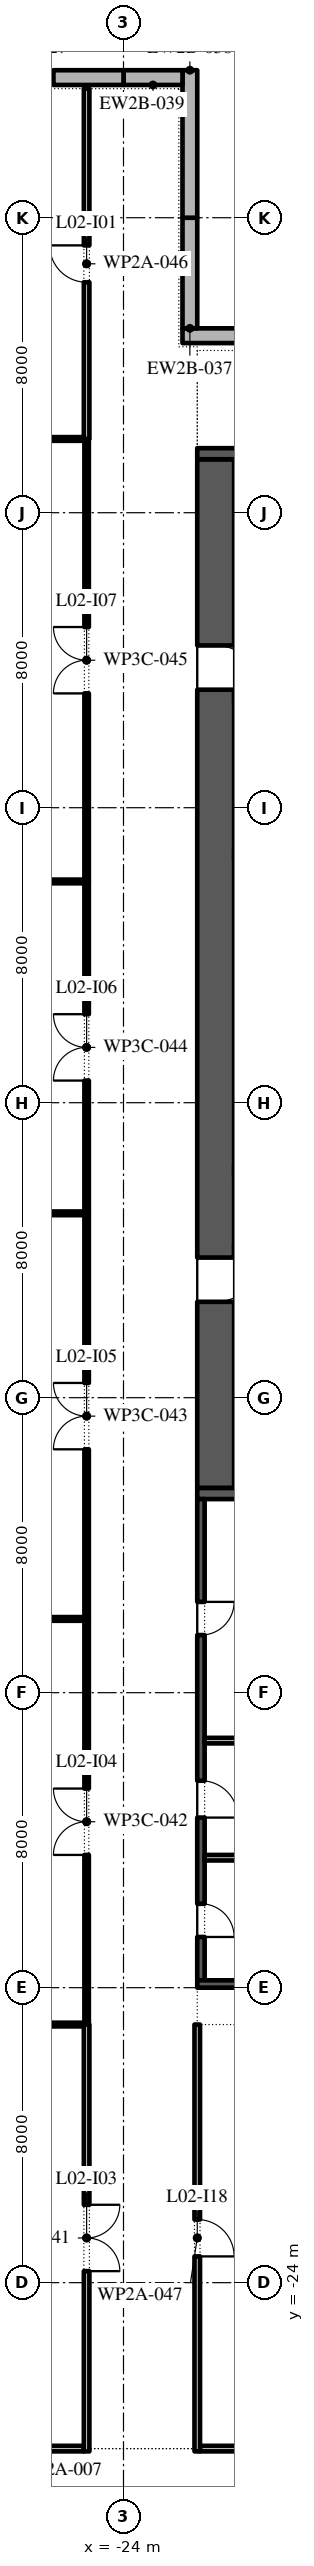
"""IFC4 building model, lengths in metres.
Left out: names, types, materials, properties, quantities, classifications, styles, units other than length and angle.
Written with IfcOpenShell. Run it as: python <this file> out.ifc"""

import sys

from ifc_helpers import new_model, si_unit, direction, frame, frame_2d, origin, place, context, subcontext, project, spatial, polyline, rectangle, outline, extrude, element, fill, save


model = new_model("IFC4")
c1 = context("Model", 3, precision=1e-05, world=origin(), true_north=direction((0.0, 1.0)))
c2 = subcontext(c1, "Body", "Model", "MODEL_VIEW")
j1 = project(units=[si_unit("LENGTHUNIT", "METRE"), si_unit("PLANEANGLEUNIT", "RADIAN")], contexts=[c1])
p1 = place(None, origin())
s1 = spatial("IfcSite", under=j1, at=p1, CompositionType="ELEMENT")
p2 = place(p1, origin())
s2 = spatial("IfcBuilding", under=s1, at=p2, CompositionType="ELEMENT")
p3 = place(p2, frame((0.0, 0.0, 14.0)))
s3 = spatial("IfcBuildingStorey", under=s2, at=p3, CompositionType="ELEMENT", Elevation=14.0)
p4 = place(p3, frame((-16.0, 28.8, 0.0), z_axis=(0.0, 0.0, 1.0), x_axis=(-1.0, 0.0, 0.0)))
e1 = element("IfcWall", 1, at=p4, inside=s3, PredefinedType="STANDARD", context=c2, shape_type="SweptSolid", body=[
    extrude(rectangle(XDim=6.4, YDim=0.4, at=frame_2d((3.2, 0.0))), origin(), (0.0, 0.0, 1.0), 4.9),
])
p5 = place(p3, frame((-22.2, 29.0, 0.0), z_axis=(0.0, 0.0, 1.0), x_axis=(0.0, 1.0, 0.0)))
e2 = element("IfcWall", 2, at=p5, inside=s3, PredefinedType="STANDARD", context=c2, shape_type="SweptSolid", body=[
    extrude(rectangle(XDim=3.0, YDim=0.4, at=frame_2d((1.5, 0.0))), origin(), (0.0, 0.0, 1.0), 4.9),
])
p6 = place(p3, frame((-22.2, 32.0, 0.0), z_axis=(0.0, 0.0, 1.0), x_axis=(0.0, 1.0, 0.0)))
e3 = element("IfcWall", 3, at=p6, inside=s3, PredefinedType="STANDARD", context=c2, shape_type="SweptSolid", body=[
    extrude(rectangle(XDim=4.0, YDim=0.4, at=frame_2d((2.0, 0.0))), origin(), (0.0, 0.0, 1.0), 4.9),
])
p7 = place(p3, frame((-22.4, 35.8, 0.0), z_axis=(0.0, 0.0, 1.0), x_axis=(-1.0, 0.0, 0.0)))
e4 = element("IfcWall", 4, at=p7, inside=s3, PredefinedType="STANDARD", context=c2, shape_type="SweptSolid", body=[
    extrude(rectangle(XDim=1.6, YDim=0.4, at=frame_2d((0.8, 0.0))), origin(), (0.0, 0.0, 1.0), 4.9),
])
p8 = place(p3, frame((-24.0, 35.8, 0.0), z_axis=(0.0, 0.0, 1.0), x_axis=(-1.0, 0.0, 0.0)))
e5 = element("IfcWall", 5, at=p8, inside=s3, PredefinedType="STANDARD", context=c2, shape_type="SweptSolid", body=[
    extrude(rectangle(XDim=8.0, YDim=0.4, at=frame_2d((4.0, 0.0))), origin(), (0.0, 0.0, 1.0), 4.9),
])
p9 = place(p8, frame((1.9, 0.0, 0.9)))
e6 = element("IfcOpeningElement", 6, at=p9, cuts=e5, PredefinedType="OPENING", context=c2, shape_type="SweptSolid", body=[
    extrude(outline(polyline([(0.0, 0.0), (1.8, 0.0), (1.8, 1.841), (1.785, 2.076), (1.739, 2.307), (1.663, 2.53), (1.559, 2.741), (1.428, 2.937), (1.273, 3.114), (1.096, 3.269), (0.9, 3.4), (0.704, 3.269), (0.527, 3.114), (0.372, 2.937), (0.241, 2.741), (0.137, 2.53), (0.061, 2.307), (0.015, 2.076), (0.0, 1.841), (0.0, 0.0)])), frame((0.0, 0.21, 0.0), z_axis=(0.0, -1.0, 0.0), x_axis=(1.0, 0.0, 0.0)), (0.0, 0.0, 1.0), 0.42),
])
p10 = place(p8, frame((4.3, 0.0, 0.9)))
e7 = element("IfcOpeningElement", 7, at=p10, cuts=e5, PredefinedType="OPENING", context=c2, shape_type="SweptSolid", body=[
    extrude(outline(polyline([(0.0, 0.0), (1.8, 0.0), (1.8, 1.841), (1.785, 2.076), (1.739, 2.307), (1.663, 2.53), (1.559, 2.741), (1.428, 2.937), (1.273, 3.114), (1.096, 3.269), (0.9, 3.4), (0.704, 3.269), (0.527, 3.114), (0.372, 2.937), (0.241, 2.741), (0.137, 2.53), (0.061, 2.307), (0.015, 2.076), (0.0, 1.841), (0.0, 0.0)])), frame((0.0, 0.21, 0.0), z_axis=(0.0, -1.0, 0.0), x_axis=(1.0, 0.0, 0.0)), (0.0, 0.0, 1.0), 0.42),
])
p11 = place(p3, frame((-21.5, -2.45, 0.0), z_axis=(0.0, 0.0, 1.0), x_axis=(0.0, 1.0, 0.0)))
e8 = element("IfcWall", 8, at=p11, inside=s3, PredefinedType="SHEAR", context=c2, shape_type="SweptSolid", body=[
    extrude(rectangle(XDim=27.9, YDim=1.0, at=frame_2d((13.95, 0.0))), origin(), (0.0, 0.0, 1.0), 4.9),
])
p12 = place(p11, frame((5.05, 0.0, 0.0)))
e9 = element("IfcOpeningElement", 9, at=p12, cuts=e8, PredefinedType="OPENING", context=c2, shape_type="SweptSolid", body=[
    extrude(rectangle(XDim=1.2, YDim=2.1, at=frame_2d((0.6, 1.05))), frame((0.0, 0.51, 0.0), z_axis=(0.0, -1.0, 0.0), x_axis=(1.0, 0.0, 0.0)), (0.0, 0.0, 1.0), 1.02),
])
p13 = place(p11, frame((21.65, 0.0, 0.0)))
e10 = element("IfcOpeningElement", 10, at=p13, cuts=e8, PredefinedType="OPENING", context=c2, shape_type="SweptSolid", body=[
    extrude(rectangle(XDim=1.2, YDim=2.1, at=frame_2d((0.6, 1.05))), frame((0.0, 0.51, 0.0), z_axis=(0.0, -1.0, 0.0), x_axis=(1.0, 0.0, 0.0)), (0.0, 0.0, 1.0), 1.02),
])
for number, where, z_axis, x_axis in (
    (11, (-22.0, -2.6, 0.0), (0.0, 0.0, 1.0), (1.0, 0.0, 0.0)),
    (12, (-22.0, 25.6, 0.0), (0.0, 0.0, 1.0), (1.0, 0.0, 0.0)),
):
    element("IfcWall", number, at=place(p3, frame(where, z_axis=z_axis, x_axis=x_axis)), inside=s3, PredefinedType="SHEAR", context=c2, shape_type="SweptSolid", body=[
        extrude(rectangle(XDim=12.0, YDim=0.3, at=frame_2d((6.0, 0.0))), origin(), (0.0, 0.0, 1.0), 4.9),
    ])
p14 = place(p3, frame((-21.9, -15.8, 0.0), z_axis=(0.0, 0.0, 1.0), x_axis=(0.0, 1.0, 0.0)))
e13 = element("IfcWall", 13, at=p14, inside=s3, PredefinedType="SHEAR", context=c2, shape_type="SweptSolid", body=[
    extrude(rectangle(XDim=13.05, YDim=0.2, at=frame_2d((6.525, 0.0))), origin(), (0.0, 0.0, 1.0), 4.9),
])
p15 = place(p14, frame((1.175, 0.0, 0.0)))
e14 = element("IfcOpeningElement", 14, at=p15, cuts=e13, PredefinedType="OPENING", context=c2, shape_type="SweptSolid", body=[
    extrude(rectangle(XDim=0.9, YDim=2.1, at=frame_2d((0.45, 1.05))), frame((0.0, 0.11, 0.0), z_axis=(0.0, -1.0, 0.0), x_axis=(1.0, 0.0, 0.0)), (0.0, 0.0, 1.0), 0.22),
])
p16 = place(p14, frame((4.413, 0.0, 0.0)))
e15 = element("IfcOpeningElement", 15, at=p16, cuts=e13, PredefinedType="OPENING", context=c2, shape_type="SweptSolid", body=[
    extrude(rectangle(XDim=1.0, YDim=2.1, at=frame_2d((0.5, 1.05))), frame((0.0, 0.11, 0.0), z_axis=(0.0, -1.0, 0.0), x_axis=(1.0, 0.0, 0.0)), (0.0, 0.0, 1.0), 0.22),
])
p17 = place(p14, frame((9.363, 0.0, 0.0)))
e16 = element("IfcOpeningElement", 16, at=p17, cuts=e13, PredefinedType="OPENING", context=c2, shape_type="SweptSolid", body=[
    extrude(rectangle(XDim=0.9, YDim=2.1, at=frame_2d((0.45, 1.05))), frame((0.0, 0.11, 0.0), z_axis=(0.0, -1.0, 0.0), x_axis=(1.0, 0.0, 0.0)), (0.0, 0.0, 1.0), 0.22),
])
p18 = place(p3, frame((-22.0, -15.9, 0.0), z_axis=(0.0, 0.0, 1.0), x_axis=(1.0, 0.0, 0.0)))
e17 = element("IfcWall", 17, at=p18, inside=s3, PredefinedType="SHEAR", context=c2, shape_type="SweptSolid", body=[
    extrude(rectangle(XDim=12.0, YDim=0.2, at=frame_2d((6.0, 0.0))), origin(), (0.0, 0.0, 1.0), 4.9),
])
for number, where, z_axis, x_axis in (
    (18, (-21.8, -9.3, 0.0), (0.0, 0.0, 1.0), (1.0, 0.0, 0.0)),
    (19, (-21.8, -12.475, 0.0), (0.0, 0.0, 1.0), (1.0, 0.0, 0.0)),
):
    element("IfcWall", number, at=place(p3, frame(where, z_axis=z_axis, x_axis=x_axis)), inside=s3, PredefinedType="PARTITIONING", context=c2, shape_type="SweptSolid", body=[
        extrude(rectangle(XDim=11.6, YDim=0.15, at=frame_2d((5.8, 0.0))), origin(), (0.0, 0.0, 1.0), 4.9),
    ])
p19 = place(p3, frame((-27.0, -28.5, 0.0), z_axis=(0.0, 0.0, 1.0), x_axis=(1.0, 0.0, 0.0)))
e20 = element("IfcWall", 20, at=p19, inside=s3, PredefinedType="PARTITIONING", context=c2, shape_type="SweptSolid", body=[
    extrude(rectangle(XDim=1.925, YDim=0.15, at=frame_2d((0.962, 0.0))), origin(), (0.0, 0.0, 1.0), 4.9),
])
p20 = place(p3, frame((-21.925, -28.5, 0.0), z_axis=(0.0, 0.0, 1.0), x_axis=(1.0, 0.0, 0.0)))
e21 = element("IfcWall", 21, at=p20, inside=s3, PredefinedType="PARTITIONING", context=c2, shape_type="SweptSolid", body=[
    extrude(rectangle(XDim=11.525, YDim=0.15, at=frame_2d((5.763, 0.0))), origin(), (0.0, 0.0, 1.0), 4.9),
])
p21 = place(p3, frame((-43.5, -17.0, 0.0), z_axis=(0.0, 0.0, 1.0), x_axis=(1.0, 0.0, 0.0)))
e22 = element("IfcWall", 22, at=p21, inside=s3, PredefinedType="PARTITIONING", context=c2, shape_type="SweptSolid", body=[
    extrude(rectangle(XDim=18.425, YDim=0.1, at=frame_2d((9.212, 0.0))), origin(), (0.0, 0.0, 1.0), 4.9),
])
p22 = place(p3, frame((-43.5, -6.0, 0.0), z_axis=(0.0, 0.0, 1.0), x_axis=(1.0, 0.0, 0.0)))
e23 = element("IfcWall", 23, at=p22, inside=s3, PredefinedType="PARTITIONING", context=c2, shape_type="SweptSolid", body=[
    extrude(rectangle(XDim=18.44, YDim=0.1, at=frame_2d((9.22, 0.0))), origin(), (0.0, 0.0, 1.0), 4.9),
])
p23 = place(p3, frame((-31.7, 5.0, 0.0), z_axis=(0.0, 0.0, 1.0), x_axis=(1.0, 0.0, 0.0)))
e24 = element("IfcWall", 24, at=p23, inside=s3, PredefinedType="PARTITIONING", context=c2, shape_type="SweptSolid", body=[
    extrude(rectangle(XDim=6.64, YDim=0.1, at=frame_2d((3.32, 0.0))), origin(), (0.0, 0.0, 1.0), 4.9),
])
p24 = place(p3, frame((-43.5, 14.0, 0.0), z_axis=(0.0, 0.0, 1.0), x_axis=(1.0, 0.0, 0.0)))
e25 = element("IfcWall", 25, at=p24, inside=s3, PredefinedType="PARTITIONING", context=c2, shape_type="SweptSolid", body=[
    extrude(rectangle(XDim=18.44, YDim=0.1, at=frame_2d((9.22, 0.0))), origin(), (0.0, 0.0, 1.0), 4.9),
])
p25 = place(p3, frame((-34.0, 26.0, 0.0), z_axis=(0.0, 0.0, 1.0), x_axis=(1.0, 0.0, 0.0)))
e26 = element("IfcWall", 26, at=p25, inside=s3, PredefinedType="PARTITIONING", context=c2, shape_type="SweptSolid", body=[
    extrude(rectangle(XDim=8.925, YDim=0.1, at=frame_2d((4.462, 0.0))), origin(), (0.0, 0.0, 1.0), 4.9),
])
p26 = place(p3, frame((-25.0, -28.575, 0.0), z_axis=(0.0, 0.0, 1.0), x_axis=(0.0, 1.0, 0.0)))
e27 = element("IfcWall", 27, at=p26, inside=s3, PredefinedType="PARTITIONING", context=c2, shape_type="SweptSolid", body=[
    extrude(rectangle(XDim=11.575, YDim=0.15, at=frame_2d((5.788, 0.0))), origin(), (0.0, 0.0, 1.0), 4.9),
])
p27 = place(p26, frame((4.887, 0.0, 0.0)))
e28 = element("IfcOpeningElement", 28, at=p27, cuts=e27, PredefinedType="OPENING", context=c2, shape_type="SweptSolid", body=[
    extrude(rectangle(XDim=1.8, YDim=2.1, at=frame_2d((0.9, 1.05))), frame((0.0, 0.085, 0.0), z_axis=(0.0, -1.0, 0.0), x_axis=(1.0, 0.0, 0.0)), (0.0, 0.0, 1.0), 0.17),
])
p28 = place(p3, frame((-25.0, -17.0, 0.0), z_axis=(0.0, 0.0, 1.0), x_axis=(0.0, 1.0, 0.0)))
e29 = element("IfcWall", 29, at=p28, inside=s3, PredefinedType="PARTITIONING", context=c2, shape_type="SweptSolid", body=[
    extrude(rectangle(XDim=11.0, YDim=0.12, at=frame_2d((5.5, 0.0))), origin(), (0.0, 0.0, 1.0), 4.9),
])
p29 = place(p28, frame((4.6, 0.0, 0.0)))
e30 = element("IfcOpeningElement", 30, at=p29, cuts=e29, PredefinedType="OPENING", context=c2, shape_type="SweptSolid", body=[
    extrude(rectangle(XDim=1.8, YDim=2.1, at=frame_2d((0.9, 1.05))), frame((0.0, 0.07, 0.0), z_axis=(0.0, -1.0, 0.0), x_axis=(1.0, 0.0, 0.0)), (0.0, 0.0, 1.0), 0.14),
])
p30 = place(p3, frame((-25.0, -6.0, 0.0), z_axis=(0.0, 0.0, 1.0), x_axis=(0.0, 1.0, 0.0)))
e31 = element("IfcWall", 31, at=p30, inside=s3, PredefinedType="PARTITIONING", context=c2, shape_type="SweptSolid", body=[
    extrude(rectangle(XDim=11.0, YDim=0.12, at=frame_2d((5.5, 0.0))), origin(), (0.0, 0.0, 1.0), 4.9),
])
p31 = place(p30, frame((4.6, 0.0, 0.0)))
e32 = element("IfcOpeningElement", 32, at=p31, cuts=e31, PredefinedType="OPENING", context=c2, shape_type="SweptSolid", body=[
    extrude(rectangle(XDim=1.8, YDim=2.1, at=frame_2d((0.9, 1.05))), frame((0.0, 0.07, 0.0), z_axis=(0.0, -1.0, 0.0), x_axis=(1.0, 0.0, 0.0)), (0.0, 0.0, 1.0), 0.14),
])
p32 = place(p3, frame((-25.0, 5.0, 0.0), z_axis=(0.0, 0.0, 1.0), x_axis=(0.0, 1.0, 0.0)))
e33 = element("IfcWall", 33, at=p32, inside=s3, PredefinedType="PARTITIONING", context=c2, shape_type="SweptSolid", body=[
    extrude(rectangle(XDim=9.0, YDim=0.12, at=frame_2d((4.5, 0.0))), origin(), (0.0, 0.0, 1.0), 4.9),
])
p33 = place(p32, frame((3.6, 0.0, 0.0)))
e34 = element("IfcOpeningElement", 34, at=p33, cuts=e33, PredefinedType="OPENING", context=c2, shape_type="SweptSolid", body=[
    extrude(rectangle(XDim=1.8, YDim=2.1, at=frame_2d((0.9, 1.05))), frame((0.0, 0.07, 0.0), z_axis=(0.0, -1.0, 0.0), x_axis=(1.0, 0.0, 0.0)), (0.0, 0.0, 1.0), 0.14),
])
p34 = place(p3, frame((-25.0, 14.0, 0.0), z_axis=(0.0, 0.0, 1.0), x_axis=(0.0, 1.0, 0.0)))
e35 = element("IfcWall", 35, at=p34, inside=s3, PredefinedType="PARTITIONING", context=c2, shape_type="SweptSolid", body=[
    extrude(rectangle(XDim=12.0, YDim=0.12, at=frame_2d((6.0, 0.0))), origin(), (0.0, 0.0, 1.0), 4.9),
])
p35 = place(p34, frame((5.1, 0.0, 0.0)))
e36 = element("IfcOpeningElement", 36, at=p35, cuts=e35, PredefinedType="OPENING", context=c2, shape_type="SweptSolid", body=[
    extrude(rectangle(XDim=1.8, YDim=2.1, at=frame_2d((0.9, 1.05))), frame((0.0, 0.07, 0.0), z_axis=(0.0, -1.0, 0.0), x_axis=(1.0, 0.0, 0.0)), (0.0, 0.0, 1.0), 0.14),
])
p36 = place(p3, frame((-25.0, 26.0, 0.0), z_axis=(0.0, 0.0, 1.0), x_axis=(0.0, 1.0, 0.0)))
e37 = element("IfcWall", 37, at=p36, inside=s3, PredefinedType="PARTITIONING", context=c2, shape_type="SweptSolid", body=[
    extrude(rectangle(XDim=9.5, YDim=0.15, at=frame_2d((4.75, 0.0))), origin(), (0.0, 0.0, 1.0), 4.9),
])
p37 = place(p36, frame((4.25, 0.0, 0.0)))
e38 = element("IfcOpeningElement", 38, at=p37, cuts=e37, PredefinedType="OPENING", context=c2, shape_type="SweptSolid", body=[
    extrude(rectangle(XDim=1.0, YDim=2.1, at=frame_2d((0.5, 1.05))), frame((0.0, 0.085, 0.0), z_axis=(0.0, -1.0, 0.0), x_axis=(1.0, 0.0, 0.0)), (0.0, 0.0, 1.0), 0.17),
])
p38 = place(p3, frame((-22.0, -28.575, 0.0), z_axis=(0.0, 0.0, 1.0), x_axis=(0.0, 1.0, 0.0)))
e39 = element("IfcWall", 39, at=p38, inside=s3, PredefinedType="PARTITIONING", context=c2, shape_type="SweptSolid", body=[
    extrude(rectangle(XDim=11.575, YDim=0.15, at=frame_2d((5.788, 0.0))), origin(), (0.0, 0.0, 1.0), 4.9),
])
p39 = place(p38, frame((5.288, 0.0, 0.0)))
e40 = element("IfcOpeningElement", 40, at=p39, cuts=e39, PredefinedType="OPENING", context=c2, shape_type="SweptSolid", body=[
    extrude(rectangle(XDim=1.0, YDim=2.1, at=frame_2d((0.5, 1.05))), frame((0.0, 0.085, 0.0), z_axis=(0.0, -1.0, 0.0), x_axis=(1.0, 0.0, 0.0)), (0.0, 0.0, 1.0), 0.17),
])
p40 = place(p9, origin())
e41 = element("IfcWindow", 41, at=p40, inside=s3, PartitioningType="DOUBLE_PANEL_VERTICAL", PredefinedType="WINDOW", context=c2, shape_type="SweptSolid", body=[
    extrude(outline(polyline([(0.0, 0.0), (1.8, 0.0), (1.8, 1.841), (1.785, 2.076), (1.739, 2.307), (1.663, 2.53), (1.559, 2.741), (1.428, 2.937), (1.273, 3.114), (1.096, 3.269), (0.9, 3.4), (0.704, 3.269), (0.527, 3.114), (0.372, 2.937), (0.241, 2.741), (0.137, 2.53), (0.061, 2.307), (0.015, 2.076), (0.0, 1.841), (0.0, 0.0)])), frame((0.0, 0.03, 0.0), z_axis=(0.0, -1.0, 0.0), x_axis=(1.0, 0.0, 0.0)), (0.0, 0.0, 1.0), 0.06),
])
fill(e6, e41)
p41 = place(p12, frame((1.2, 0.0, 0.0), z_axis=(0.0, 0.0, 1.0), x_axis=(-1.0, 0.0, 0.0)))
e42 = element("IfcDoor", 42, at=p41, inside=s3, OperationType="SINGLE_SWING_RIGHT", PredefinedType="DOOR", context=c2, shape_type="SweptSolid", body=[
    extrude(rectangle(XDim=1.2, YDim=2.1, at=frame_2d((0.6, 1.05))), frame((0.0, 0.025, 0.0), z_axis=(0.0, -1.0, 0.0), x_axis=(1.0, 0.0, 0.0)), (0.0, 0.0, 1.0), 0.05),
])
fill(e9, e42)
p42 = place(p13, frame((1.2, 0.0, 0.0), z_axis=(0.0, 0.0, 1.0), x_axis=(-1.0, 0.0, 0.0)))
e43 = element("IfcDoor", 43, at=p42, inside=s3, OperationType="SINGLE_SWING_LEFT", PredefinedType="DOOR", context=c2, shape_type="SweptSolid", body=[
    extrude(rectangle(XDim=1.2, YDim=2.1, at=frame_2d((0.6, 1.05))), frame((0.0, 0.025, 0.0), z_axis=(0.0, -1.0, 0.0), x_axis=(1.0, 0.0, 0.0)), (0.0, 0.0, 1.0), 0.05),
])
fill(e10, e43)
p43 = place(p15, frame((0.9, -0.15, 0.0), z_axis=(0.0, 0.0, 1.0), x_axis=(-1.0, 0.0, 0.0)))
e44 = element("IfcDoor", 44, at=p43, inside=s3, OperationType="SINGLE_SWING_LEFT", PredefinedType="DOOR", context=c2, shape_type="SweptSolid", body=[
    extrude(rectangle(XDim=0.9, YDim=2.1, at=frame_2d((0.45, 1.05))), frame((0.0, -0.05, 0.0), z_axis=(0.0, -1.0, 0.0), x_axis=(1.0, 0.0, 0.0)), (0.0, 0.0, 1.0), 0.05),
])
fill(e14, e44)
p44 = place(p16, frame((1.0, -0.15, 0.0), z_axis=(0.0, 0.0, 1.0), x_axis=(-1.0, 0.0, 0.0)))
e45 = element("IfcDoor", 45, at=p44, inside=s3, OperationType="SINGLE_SWING_LEFT", PredefinedType="DOOR", context=c2, shape_type="SweptSolid", body=[
    extrude(rectangle(XDim=1.0, YDim=2.1, at=frame_2d((0.5, 1.05))), frame((0.0, -0.05, 0.0), z_axis=(0.0, -1.0, 0.0), x_axis=(1.0, 0.0, 0.0)), (0.0, 0.0, 1.0), 0.05),
])
fill(e15, e45)
p45 = place(p17, frame((0.9, -0.15, 0.0), z_axis=(0.0, 0.0, 1.0), x_axis=(-1.0, 0.0, 0.0)))
e46 = element("IfcDoor", 46, at=p45, inside=s3, OperationType="SINGLE_SWING_RIGHT", PredefinedType="DOOR", context=c2, shape_type="SweptSolid", body=[
    extrude(rectangle(XDim=0.9, YDim=2.1, at=frame_2d((0.45, 1.05))), frame((0.0, -0.05, 0.0), z_axis=(0.0, -1.0, 0.0), x_axis=(1.0, 0.0, 0.0)), (0.0, 0.0, 1.0), 0.05),
])
fill(e16, e46)
p46 = place(p37, origin())
e47 = element("IfcDoor", 47, at=p46, inside=s3, OperationType="SINGLE_SWING_LEFT", PredefinedType="DOOR", context=c2, shape_type="SweptSolid", body=[
    extrude(rectangle(XDim=1.0, YDim=2.1, at=frame_2d((0.5, 1.05))), frame((0.0, 0.025, 0.0), z_axis=(0.0, -1.0, 0.0), x_axis=(1.0, 0.0, 0.0)), (0.0, 0.0, 1.0), 0.05),
])
fill(e38, e47)
p47 = place(p27, frame((1.8, 0.0, 0.0), z_axis=(0.0, 0.0, 1.0), x_axis=(-1.0, 0.0, 0.0)))
e48 = element("IfcDoor", 48, at=p47, inside=s3, OperationType="SINGLE_SWING_RIGHT", PredefinedType="DOOR", context=c2, shape_type="SweptSolid", body=[
    extrude(rectangle(XDim=1.8, YDim=2.1, at=frame_2d((0.9, 1.05))), frame((0.0, 0.025, 0.0), z_axis=(0.0, -1.0, 0.0), x_axis=(1.0, 0.0, 0.0)), (0.0, 0.0, 1.0), 0.05),
])
fill(e28, e48)
p48 = place(p29, origin())
e49 = element("IfcDoor", 49, at=p48, inside=s3, OperationType="SINGLE_SWING_RIGHT", PredefinedType="DOOR", context=c2, shape_type="SweptSolid", body=[
    extrude(rectangle(XDim=1.8, YDim=2.1, at=frame_2d((0.9, 1.05))), frame((0.0, 0.025, 0.0), z_axis=(0.0, -1.0, 0.0), x_axis=(1.0, 0.0, 0.0)), (0.0, 0.0, 1.0), 0.05),
])
fill(e30, e49)
p49 = place(p31, origin())
e50 = element("IfcDoor", 50, at=p49, inside=s3, OperationType="SINGLE_SWING_RIGHT", PredefinedType="DOOR", context=c2, shape_type="SweptSolid", body=[
    extrude(rectangle(XDim=1.8, YDim=2.1, at=frame_2d((0.9, 1.05))), frame((0.0, 0.025, 0.0), z_axis=(0.0, -1.0, 0.0), x_axis=(1.0, 0.0, 0.0)), (0.0, 0.0, 1.0), 0.05),
])
fill(e32, e50)
p50 = place(p33, origin())
e51 = element("IfcDoor", 51, at=p50, inside=s3, OperationType="SINGLE_SWING_RIGHT", PredefinedType="DOOR", context=c2, shape_type="SweptSolid", body=[
    extrude(rectangle(XDim=1.8, YDim=2.1, at=frame_2d((0.9, 1.05))), frame((0.0, 0.025, 0.0), z_axis=(0.0, -1.0, 0.0), x_axis=(1.0, 0.0, 0.0)), (0.0, 0.0, 1.0), 0.05),
])
fill(e34, e51)
p51 = place(p35, origin())
e52 = element("IfcDoor", 52, at=p51, inside=s3, OperationType="SINGLE_SWING_RIGHT", PredefinedType="DOOR", context=c2, shape_type="SweptSolid", body=[
    extrude(rectangle(XDim=1.8, YDim=2.1, at=frame_2d((0.9, 1.05))), frame((0.0, 0.025, 0.0), z_axis=(0.0, -1.0, 0.0), x_axis=(1.0, 0.0, 0.0)), (0.0, 0.0, 1.0), 0.05),
])
fill(e36, e52)
p52 = place(p39, frame((1.0, 0.0, 0.0), z_axis=(0.0, 0.0, 1.0), x_axis=(-1.0, 0.0, 0.0)))
e53 = element("IfcDoor", 53, at=p52, inside=s3, OperationType="SINGLE_SWING_LEFT", PredefinedType="DOOR", context=c2, shape_type="SweptSolid", body=[
    extrude(rectangle(XDim=1.0, YDim=2.1, at=frame_2d((0.5, 1.05))), frame((0.0, 0.025, 0.0), z_axis=(0.0, -1.0, 0.0), x_axis=(1.0, 0.0, 0.0)), (0.0, 0.0, 1.0), 0.05),
])
fill(e40, e53)
save(model, sys.argv[1])
